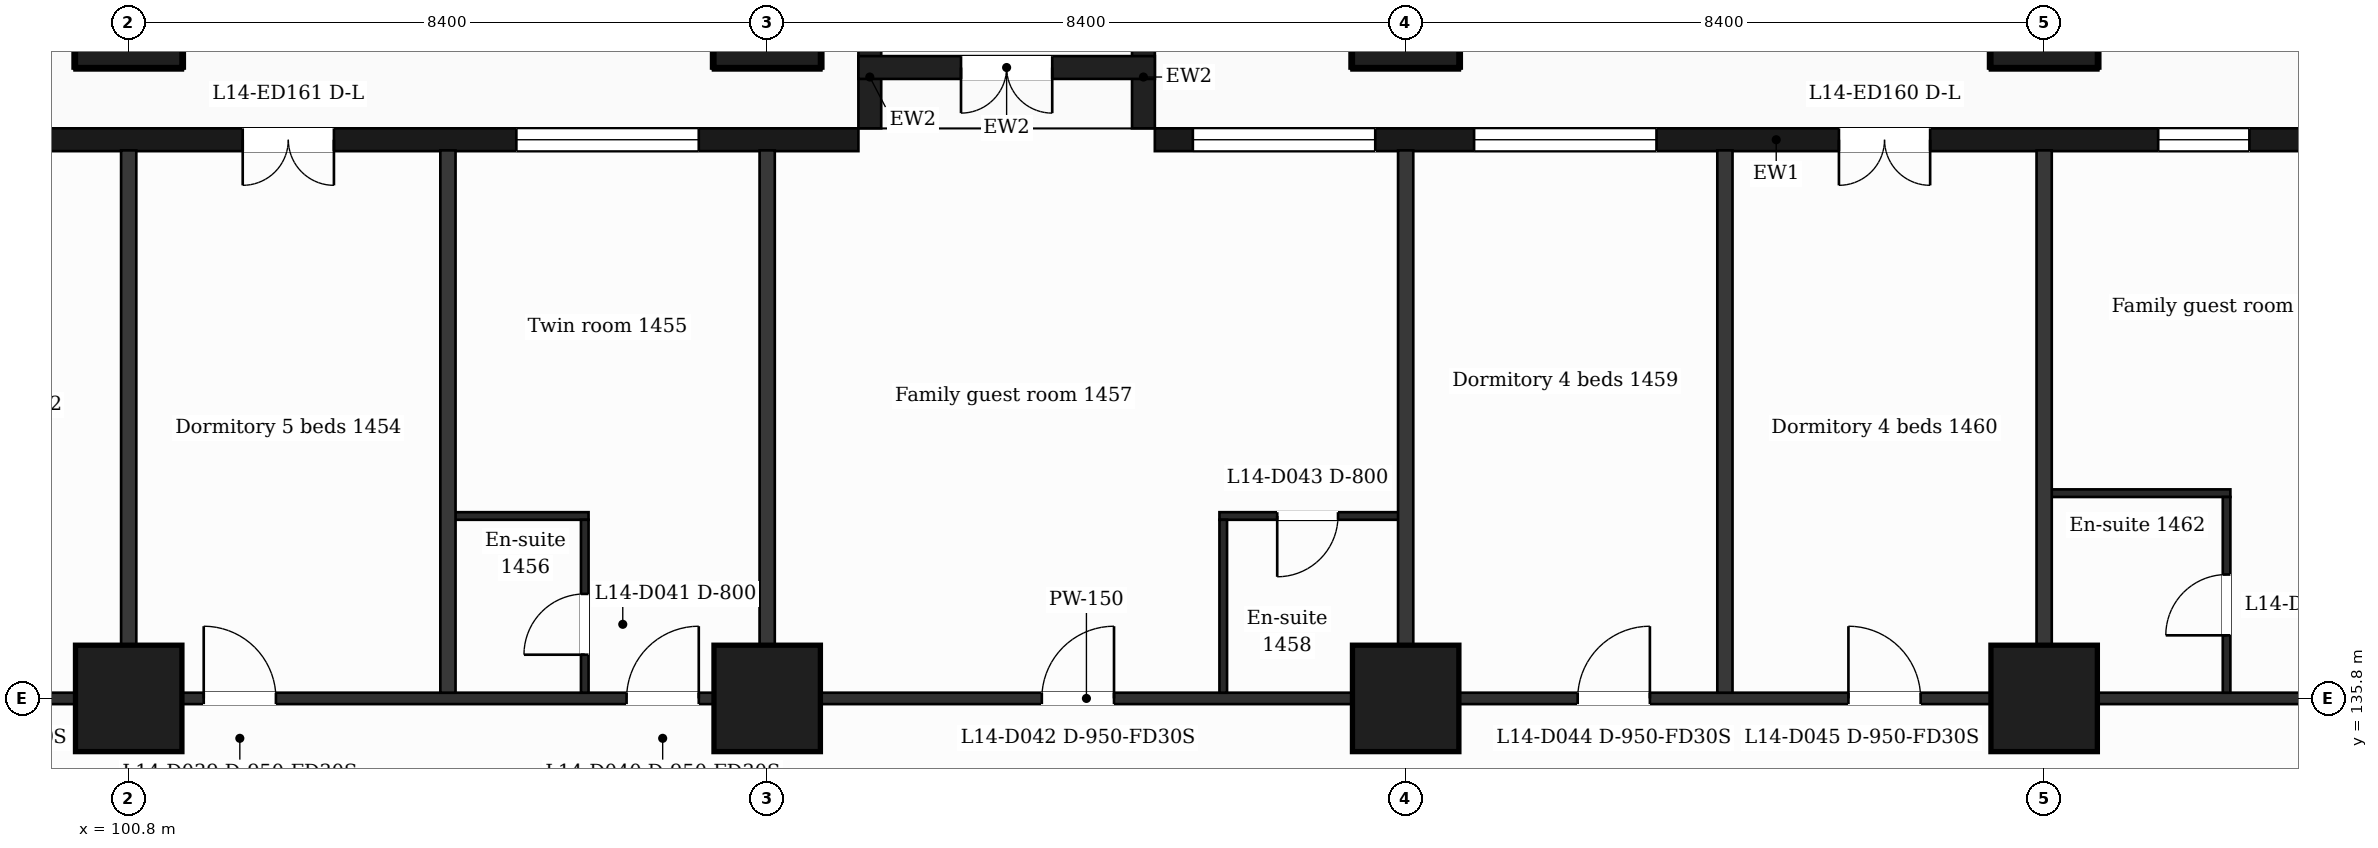
"""IFC4 building model, lengths in metres.
Left out: names, types, materials, properties, quantities, classifications, styles, units other than length and angle.
Written with IfcOpenShell. Run it as: python <this file> out.ifc"""

import sys

from ifc_helpers import new_model, si_unit, direction, frame, frame_2d, origin, origin_2d, place, context, subcontext, project, spatial, rectangle, extrude, element, fill, save


model = new_model("IFC4")
c1 = context("Model", 3, precision=1e-05, world=origin(), true_north=direction((0.0, 1.0)))
c2 = subcontext(c1, "Body", "Model", "MODEL_VIEW")
j1 = project(units=[si_unit("LENGTHUNIT", "METRE"), si_unit("PLANEANGLEUNIT", "RADIAN")], contexts=[c1])
p1 = place(None, origin())
s1 = spatial("IfcSite", under=j1, at=p1, CompositionType="ELEMENT")
p2 = place(p1, origin())
s2 = spatial("IfcBuilding", under=s1, at=p2, CompositionType="ELEMENT")
p3 = place(p2, frame((0.0, 0.0, 67.0)))
s3 = spatial("IfcBuildingStorey", under=s2, at=p3, CompositionType="ELEMENT", Elevation=67.0)
for number, where, z_axis, x_axis in (
    (1, (100.8, 135.8, 0.0), (0.0, 0.0, 1.0), (1.0, 0.0, 0.0)),
    (2, (109.2, 135.8, 0.0), (0.0, 0.0, 1.0), (1.0, 0.0, 0.0)),
    (3, (117.6, 135.8, 0.0), (0.0, 0.0, 1.0), (1.0, 0.0, 0.0)),
    (4, (126.0, 135.8, 0.0), (0.0, 0.0, 1.0), (1.0, 0.0, 0.0)),
    (5, (100.8, 144.8, 0.0), (0.0, 0.0, 1.0), (1.0, 0.0, 0.0)),
    (6, (109.2, 144.8, 0.0), (0.0, 0.0, 1.0), (1.0, 0.0, 0.0)),
    (7, (117.6, 144.8, 0.0), (0.0, 0.0, 1.0), (1.0, 0.0, 0.0)),
    (8, (126.0, 144.8, 0.0), (0.0, 0.0, 1.0), (1.0, 0.0, 0.0)),
):
    element("IfcColumn", number, at=place(p3, frame(where, z_axis=z_axis, x_axis=x_axis)), inside=s3, PredefinedType="COLUMN", context=c2, shape_type="SweptSolid", body=[
        extrude(rectangle(XDim=1.4, YDim=1.4, at=origin_2d()), origin(), (0.0, 0.0, 1.0), 3.5),
    ])
p4 = place(p3, frame((130.65, 143.15, 0.0), z_axis=(0.0, 0.0, 1.0), x_axis=(-1.0, 0.0, 0.0)))
e9 = element("IfcWall", 9, at=p4, inside=s3, PredefinedType="SOLIDWALL", context=c2, shape_type="SweptSolid", body=[
    extrude(rectangle(XDim=16.35, YDim=0.3, at=frame_2d((8.175, 0.0))), origin(), (0.0, 0.0, 1.0), 3.18),
])
p5 = place(p4, frame((1.95, 0.0, 0.9)))
e10 = element("IfcOpeningElement", 10, at=p5, cuts=e9, PredefinedType="OPENING", context=c2, shape_type="SweptSolid", body=[
    extrude(rectangle(XDim=1.2, YDim=2.1, at=frame_2d((0.6, 1.05))), frame((0.0, 0.16, 0.0), z_axis=(0.0, -1.0, 0.0), x_axis=(1.0, 0.0, 0.0)), (0.0, 0.0, 1.0), 0.32),
])
p6 = place(p4, frame((6.15, 0.0, 0.0)))
e11 = element("IfcOpeningElement", 11, at=p6, cuts=e9, PredefinedType="OPENING", context=c2, shape_type="SweptSolid", body=[
    extrude(rectangle(XDim=1.2, YDim=2.4, at=frame_2d((0.6, 1.2))), frame((0.0, 0.16, 0.0), z_axis=(0.0, -1.0, 0.0), x_axis=(1.0, 0.0, 0.0)), (0.0, 0.0, 1.0), 0.32),
])
p7 = place(p4, frame((9.75, 0.0, 0.9)))
e12 = element("IfcOpeningElement", 12, at=p7, cuts=e9, PredefinedType="OPENING", context=c2, shape_type="SweptSolid", body=[
    extrude(rectangle(XDim=2.4, YDim=2.1, at=frame_2d((1.2, 1.05))), frame((0.0, 0.16, 0.0), z_axis=(0.0, -1.0, 0.0), x_axis=(1.0, 0.0, 0.0)), (0.0, 0.0, 1.0), 0.32),
])
p8 = place(p4, frame((13.45, 0.0, 0.9)))
e13 = element("IfcOpeningElement", 13, at=p8, cuts=e9, PredefinedType="OPENING", context=c2, shape_type="SweptSolid", body=[
    extrude(rectangle(XDim=2.4, YDim=2.1, at=frame_2d((1.2, 1.05))), frame((0.0, 0.16, 0.0), z_axis=(0.0, -1.0, 0.0), x_axis=(1.0, 0.0, 0.0)), (0.0, 0.0, 1.0), 0.32),
])
p9 = place(p3, frame((110.4, 143.15, 0.0), z_axis=(0.0, 0.0, 1.0), x_axis=(-1.0, 0.0, 0.0)))
e14 = element("IfcWall", 14, at=p9, inside=s3, PredefinedType="SOLIDWALL", context=c2, shape_type="SweptSolid", body=[
    extrude(rectangle(XDim=14.4, YDim=0.3, at=frame_2d((7.2, 0.0))), origin(), (0.0, 0.0, 1.0), 3.18),
])
p10 = place(p9, frame((2.1, 0.0, 0.9)))
e15 = element("IfcOpeningElement", 15, at=p10, cuts=e14, PredefinedType="OPENING", context=c2, shape_type="SweptSolid", body=[
    extrude(rectangle(XDim=2.4, YDim=2.1, at=frame_2d((1.2, 1.05))), frame((0.0, 0.16, 0.0), z_axis=(0.0, -1.0, 0.0), x_axis=(1.0, 0.0, 0.0)), (0.0, 0.0, 1.0), 0.32),
])
p11 = place(p9, frame((6.9, 0.0, 0.0)))
e16 = element("IfcOpeningElement", 16, at=p11, cuts=e14, PredefinedType="OPENING", context=c2, shape_type="SweptSolid", body=[
    extrude(rectangle(XDim=1.2, YDim=2.4, at=frame_2d((0.6, 1.2))), frame((0.0, 0.16, 0.0), z_axis=(0.0, -1.0, 0.0), x_axis=(1.0, 0.0, 0.0)), (0.0, 0.0, 1.0), 0.32),
])
p12 = place(p9, frame((11.1, 0.0, 0.9)))
e17 = element("IfcOpeningElement", 17, at=p12, cuts=e14, PredefinedType="OPENING", context=c2, shape_type="SweptSolid", body=[
    extrude(rectangle(XDim=1.2, YDim=2.1, at=frame_2d((0.6, 1.05))), frame((0.0, 0.16, 0.0), z_axis=(0.0, -1.0, 0.0), x_axis=(1.0, 0.0, 0.0)), (0.0, 0.0, 1.0), 0.32),
])
for number, where, z_axis, x_axis in (
    (18, (114.15, 143.3, 0.0), (0.0, 0.0, 1.0), (0.0, 1.0, 0.0)),
    (19, (110.55, 143.3, 0.0), (0.0, 0.0, 1.0), (0.0, 1.0, 0.0)),
):
    element("IfcWall", number, at=place(p3, frame(where, z_axis=z_axis, x_axis=x_axis)), inside=s3, PredefinedType="SOLIDWALL", context=c2, shape_type="SweptSolid", body=[
        extrude(rectangle(XDim=1.35, YDim=0.3, at=frame_2d((0.675, 0.0))), origin(), (0.0, 0.0, 1.0), 3.18),
    ])
p13 = place(p3, frame((114.3, 144.1, 0.0), z_axis=(0.0, 0.0, 1.0), x_axis=(-1.0, 0.0, 0.0)))
e20 = element("IfcWall", 20, at=p13, inside=s3, PredefinedType="SOLIDWALL", context=c2, shape_type="SweptSolid", body=[
    extrude(rectangle(XDim=3.9, YDim=0.3, at=frame_2d((1.95, 0.0))), origin(), (0.0, 0.0, 1.0), 3.18),
])
p14 = place(p13, frame((1.35, 0.0, 0.0)))
e21 = element("IfcOpeningElement", 21, at=p14, cuts=e20, PredefinedType="OPENING", context=c2, shape_type="SweptSolid", body=[
    extrude(rectangle(XDim=1.2, YDim=2.4, at=frame_2d((0.6, 1.2))), frame((0.0, 0.16, 0.0), z_axis=(0.0, -1.0, 0.0), x_axis=(1.0, 0.0, 0.0)), (0.0, 0.0, 1.0), 0.32),
])
p15 = place(p3, frame((90.895, 135.8, 0.0), z_axis=(0.0, 0.0, 1.0), x_axis=(1.0, 0.0, 0.0)))
e22 = element("IfcWall", 22, at=p15, inside=s3, PredefinedType="PARTITIONING", context=c2, shape_type="SweptSolid", body=[
    extrude(rectangle(XDim=45.011, YDim=0.15, at=frame_2d((22.505, 0.0))), origin(), (0.0, 0.0, 1.0), 3.18),
])
p16 = place(p15, frame((7.068, 0.0, 0.0)))
e23 = element("IfcOpeningElement", 23, at=p16, cuts=e22, PredefinedType="OPENING", context=c2, shape_type="SweptSolid", body=[
    extrude(rectangle(XDim=0.95, YDim=2.1, at=frame_2d((0.475, 1.05))), frame((0.0, 0.085, 0.0), z_axis=(0.0, -1.0, 0.0), x_axis=(1.0, 0.0, 0.0)), (0.0, 0.0, 1.0), 0.17),
])
p17 = place(p15, frame((10.892, 0.0, 0.0)))
e24 = element("IfcOpeningElement", 24, at=p17, cuts=e22, PredefinedType="OPENING", context=c2, shape_type="SweptSolid", body=[
    extrude(rectangle(XDim=0.95, YDim=2.1, at=frame_2d((0.475, 1.05))), frame((0.0, 0.085, 0.0), z_axis=(0.0, -1.0, 0.0), x_axis=(1.0, 0.0, 0.0)), (0.0, 0.0, 1.0), 0.17),
])
p18 = place(p15, frame((16.455, 0.0, 0.0)))
e25 = element("IfcOpeningElement", 25, at=p18, cuts=e22, PredefinedType="OPENING", context=c2, shape_type="SweptSolid", body=[
    extrude(rectangle(XDim=0.95, YDim=2.1, at=frame_2d((0.475, 1.05))), frame((0.0, 0.085, 0.0), z_axis=(0.0, -1.0, 0.0), x_axis=(1.0, 0.0, 0.0)), (0.0, 0.0, 1.0), 0.17),
])
p19 = place(p15, frame((21.918, 0.0, 0.0)))
e26 = element("IfcOpeningElement", 26, at=p19, cuts=e22, PredefinedType="OPENING", context=c2, shape_type="SweptSolid", body=[
    extrude(rectangle(XDim=0.95, YDim=2.1, at=frame_2d((0.475, 1.05))), frame((0.0, 0.085, 0.0), z_axis=(0.0, -1.0, 0.0), x_axis=(1.0, 0.0, 0.0)), (0.0, 0.0, 1.0), 0.17),
])
p20 = place(p15, frame((28.969, 0.0, 0.0)))
e27 = element("IfcOpeningElement", 27, at=p20, cuts=e22, PredefinedType="OPENING", context=c2, shape_type="SweptSolid", body=[
    extrude(rectangle(XDim=0.95, YDim=2.1, at=frame_2d((0.475, 1.05))), frame((0.0, 0.085, 0.0), z_axis=(0.0, -1.0, 0.0), x_axis=(1.0, 0.0, 0.0)), (0.0, 0.0, 1.0), 0.17),
])
p21 = place(p15, frame((32.531, 0.0, 0.0)))
e28 = element("IfcOpeningElement", 28, at=p21, cuts=e22, PredefinedType="OPENING", context=c2, shape_type="SweptSolid", body=[
    extrude(rectangle(XDim=0.95, YDim=2.1, at=frame_2d((0.475, 1.05))), frame((0.0, 0.085, 0.0), z_axis=(0.0, -1.0, 0.0), x_axis=(1.0, 0.0, 0.0)), (0.0, 0.0, 1.0), 0.17),
])
p22 = place(p15, frame((40.929, 0.0, 0.0)))
e29 = element("IfcOpeningElement", 29, at=p22, cuts=e22, PredefinedType="OPENING", context=c2, shape_type="SweptSolid", body=[
    extrude(rectangle(XDim=0.95, YDim=2.1, at=frame_2d((0.475, 1.05))), frame((0.0, 0.085, 0.0), z_axis=(0.0, -1.0, 0.0), x_axis=(1.0, 0.0, 0.0)), (0.0, 0.0, 1.0), 0.17),
])
p23 = place(p3, frame((105.0, 138.2, 0.0), z_axis=(0.0, 0.0, 1.0), x_axis=(1.0, 0.0, 0.0)))
e30 = element("IfcWall", 30, at=p23, inside=s3, PredefinedType="PARTITIONING", context=c2, shape_type="SweptSolid", body=[
    extrude(rectangle(XDim=1.85, YDim=0.1, at=frame_2d((0.925, 0.0))), origin(), (0.0, 0.0, 1.0), 3.18),
])
p24 = place(p3, frame((115.15, 138.2, 0.0), z_axis=(0.0, 0.0, 1.0), x_axis=(1.0, 0.0, 0.0)))
e31 = element("IfcWall", 31, at=p24, inside=s3, PredefinedType="PARTITIONING", context=c2, shape_type="SweptSolid", body=[
    extrude(rectangle(XDim=2.45, YDim=0.1, at=frame_2d((1.225, 0.0))), origin(), (0.0, 0.0, 1.0), 3.18),
])
p25 = place(p24, frame((0.76, 0.0, 0.0)))
e32 = element("IfcOpeningElement", 32, at=p25, cuts=e31, PredefinedType="OPENING", context=c2, shape_type="SweptSolid", body=[
    extrude(rectangle(XDim=0.8, YDim=2.1, at=frame_2d((0.4, 1.05))), frame((0.0, 0.06, 0.0), z_axis=(0.0, -1.0, 0.0), x_axis=(1.0, 0.0, 0.0)), (0.0, 0.0, 1.0), 0.12),
])
p26 = place(p3, frame((126.0, 138.5, 0.0), z_axis=(0.0, 0.0, 1.0), x_axis=(1.0, 0.0, 0.0)))
e33 = element("IfcWall", 33, at=p26, inside=s3, PredefinedType="PARTITIONING", context=c2, shape_type="SweptSolid", body=[
    extrude(rectangle(XDim=2.45, YDim=0.1, at=frame_2d((1.225, 0.0))), origin(), (0.0, 0.0, 1.0), 3.18),
])
for number, where, z_axis, x_axis in (
    (34, (100.8, 135.875, 0.0), (0.0, 0.0, 1.0), (0.0, 1.0, 0.0)),
    (35, (105.0, 135.875, 0.0), (0.0, 0.0, 1.0), (0.0, 1.0, 0.0)),
):
    element("IfcWall", number, at=place(p3, frame(where, z_axis=z_axis, x_axis=x_axis)), inside=s3, PredefinedType="PARTITIONING", context=c2, shape_type="SweptSolid", body=[
        extrude(rectangle(XDim=7.135, YDim=0.2, at=frame_2d((3.567, 0.0))), origin(), (0.0, 0.0, 1.0), 3.18),
    ])
p27 = place(p3, frame((106.8, 135.875, 0.0), z_axis=(0.0, 0.0, 1.0), x_axis=(0.0, 1.0, 0.0)))
e36 = element("IfcWall", 36, at=p27, inside=s3, PredefinedType="PARTITIONING", context=c2, shape_type="SweptSolid", body=[
    extrude(rectangle(XDim=2.275, YDim=0.1, at=frame_2d((1.137, 0.0))), origin(), (0.0, 0.0, 1.0), 3.18),
])
p28 = place(p27, frame((0.5, 0.0, 0.0)))
e37 = element("IfcOpeningElement", 37, at=p28, cuts=e36, PredefinedType="OPENING", context=c2, shape_type="SweptSolid", body=[
    extrude(rectangle(XDim=0.8, YDim=2.1, at=frame_2d((0.4, 1.05))), frame((0.0, 0.06, 0.0), z_axis=(0.0, -1.0, 0.0), x_axis=(1.0, 0.0, 0.0)), (0.0, 0.0, 1.0), 0.12),
])
p29 = place(p3, frame((109.2, 135.875, 0.0), z_axis=(0.0, 0.0, 1.0), x_axis=(0.0, 1.0, 0.0)))
e38 = element("IfcWall", 38, at=p29, inside=s3, PredefinedType="PARTITIONING", context=c2, shape_type="SweptSolid", body=[
    extrude(rectangle(XDim=7.135, YDim=0.2, at=frame_2d((3.567, 0.0))), origin(), (0.0, 0.0, 1.0), 3.18),
])
p30 = place(p3, frame((115.2, 135.875, 0.0), z_axis=(0.0, 0.0, 1.0), x_axis=(0.0, 1.0, 0.0)))
e39 = element("IfcWall", 39, at=p30, inside=s3, PredefinedType="PARTITIONING", context=c2, shape_type="SweptSolid", body=[
    extrude(rectangle(XDim=2.275, YDim=0.1, at=frame_2d((1.137, 0.0))), origin(), (0.0, 0.0, 1.0), 3.18),
])
for number, where, z_axis, x_axis in (
    (40, (117.6, 135.875, 0.0), (0.0, 0.0, 1.0), (0.0, 1.0, 0.0)),
    (41, (121.8, 135.875, 0.0), (0.0, 0.0, 1.0), (0.0, 1.0, 0.0)),
    (42, (126.0, 135.875, 0.0), (0.0, 0.0, 1.0), (0.0, 1.0, 0.0)),
):
    element("IfcWall", number, at=place(p3, frame(where, z_axis=z_axis, x_axis=x_axis)), inside=s3, PredefinedType="PARTITIONING", context=c2, shape_type="SweptSolid", body=[
        extrude(rectangle(XDim=7.135, YDim=0.2, at=frame_2d((3.567, 0.0))), origin(), (0.0, 0.0, 1.0), 3.18),
    ])
p31 = place(p3, frame((128.4, 135.875, 0.0), z_axis=(0.0, 0.0, 1.0), x_axis=(0.0, 1.0, 0.0)))
e43 = element("IfcWall", 43, at=p31, inside=s3, PredefinedType="PARTITIONING", context=c2, shape_type="SweptSolid", body=[
    extrude(rectangle(XDim=2.575, YDim=0.1, at=frame_2d((1.288, 0.0))), origin(), (0.0, 0.0, 1.0), 3.18),
])
p32 = place(p31, frame((0.755, 0.0, 0.0)))
e44 = element("IfcOpeningElement", 44, at=p32, cuts=e43, PredefinedType="OPENING", context=c2, shape_type="SweptSolid", body=[
    extrude(rectangle(XDim=0.8, YDim=2.1, at=frame_2d((0.4, 1.05))), frame((0.0, 0.06, 0.0), z_axis=(0.0, -1.0, 0.0), x_axis=(1.0, 0.0, 0.0)), (0.0, 0.0, 1.0), 0.12),
])
p33 = place(p5, origin())
e45 = element("IfcWindow", 45, at=p33, inside=s3, PartitioningType="SINGLE_PANEL", PredefinedType="WINDOW", context=c2, shape_type="SweptSolid", body=[
    extrude(rectangle(XDim=1.2, YDim=2.1, at=frame_2d((0.6, 1.05))), frame((0.0, 0.03, 0.0), z_axis=(0.0, -1.0, 0.0), x_axis=(1.0, 0.0, 0.0)), (0.0, 0.0, 1.0), 0.06),
])
fill(e10, e45)
p34 = place(p6, origin())
e46 = element("IfcDoor", 46, at=p34, inside=s3, OperationType="DOUBLE_DOOR_SINGLE_SWING", PredefinedType="DOOR", context=c2, shape_type="SweptSolid", body=[
    extrude(rectangle(XDim=1.2, YDim=2.4, at=frame_2d((0.6, 1.2))), frame((0.0, 0.025, 0.0), z_axis=(0.0, -1.0, 0.0), x_axis=(1.0, 0.0, 0.0)), (0.0, 0.0, 1.0), 0.05),
])
fill(e11, e46)
p35 = place(p7, origin())
e47 = element("IfcWindow", 47, at=p35, inside=s3, PartitioningType="SINGLE_PANEL", PredefinedType="WINDOW", context=c2, shape_type="SweptSolid", body=[
    extrude(rectangle(XDim=2.4, YDim=2.1, at=frame_2d((1.2, 1.05))), frame((0.0, 0.03, 0.0), z_axis=(0.0, -1.0, 0.0), x_axis=(1.0, 0.0, 0.0)), (0.0, 0.0, 1.0), 0.06),
])
fill(e12, e47)
p36 = place(p8, origin())
e48 = element("IfcWindow", 48, at=p36, inside=s3, PartitioningType="SINGLE_PANEL", PredefinedType="WINDOW", context=c2, shape_type="SweptSolid", body=[
    extrude(rectangle(XDim=2.4, YDim=2.1, at=frame_2d((1.2, 1.05))), frame((0.0, 0.03, 0.0), z_axis=(0.0, -1.0, 0.0), x_axis=(1.0, 0.0, 0.0)), (0.0, 0.0, 1.0), 0.06),
])
fill(e13, e48)
p37 = place(p10, origin())
e49 = element("IfcWindow", 49, at=p37, inside=s3, PartitioningType="SINGLE_PANEL", PredefinedType="WINDOW", context=c2, shape_type="SweptSolid", body=[
    extrude(rectangle(XDim=2.4, YDim=2.1, at=frame_2d((1.2, 1.05))), frame((0.0, 0.03, 0.0), z_axis=(0.0, -1.0, 0.0), x_axis=(1.0, 0.0, 0.0)), (0.0, 0.0, 1.0), 0.06),
])
fill(e15, e49)
p38 = place(p11, origin())
e50 = element("IfcDoor", 50, at=p38, inside=s3, OperationType="DOUBLE_DOOR_SINGLE_SWING", PredefinedType="DOOR", context=c2, shape_type="SweptSolid", body=[
    extrude(rectangle(XDim=1.2, YDim=2.4, at=frame_2d((0.6, 1.2))), frame((0.0, 0.025, 0.0), z_axis=(0.0, -1.0, 0.0), x_axis=(1.0, 0.0, 0.0)), (0.0, 0.0, 1.0), 0.05),
])
fill(e16, e50)
p39 = place(p14, origin())
e51 = element("IfcDoor", 51, at=p39, inside=s3, OperationType="DOUBLE_DOOR_SINGLE_SWING", PredefinedType="DOOR", context=c2, shape_type="SweptSolid", body=[
    extrude(rectangle(XDim=1.2, YDim=2.4, at=frame_2d((0.6, 1.2))), frame((0.0, 0.025, 0.0), z_axis=(0.0, -1.0, 0.0), x_axis=(1.0, 0.0, 0.0)), (0.0, 0.0, 1.0), 0.05),
])
fill(e21, e51)
p40 = place(p17, origin())
e52 = element("IfcDoor", 52, at=p40, inside=s3, OperationType="SINGLE_SWING_LEFT", PredefinedType="DOOR", context=c2, shape_type="SweptSolid", body=[
    extrude(rectangle(XDim=0.95, YDim=2.1, at=frame_2d((0.475, 1.05))), frame((0.0, 0.025, 0.0), z_axis=(0.0, -1.0, 0.0), x_axis=(1.0, 0.0, 0.0)), (0.0, 0.0, 1.0), 0.05),
])
fill(e24, e52)
p41 = place(p18, origin())
e53 = element("IfcDoor", 53, at=p41, inside=s3, OperationType="SINGLE_SWING_RIGHT", PredefinedType="DOOR", context=c2, shape_type="SweptSolid", body=[
    extrude(rectangle(XDim=0.95, YDim=2.1, at=frame_2d((0.475, 1.05))), frame((0.0, 0.025, 0.0), z_axis=(0.0, -1.0, 0.0), x_axis=(1.0, 0.0, 0.0)), (0.0, 0.0, 1.0), 0.05),
])
fill(e25, e53)
p42 = place(p28, origin())
e54 = element("IfcDoor", 54, at=p42, inside=s3, OperationType="SINGLE_SWING_LEFT", PredefinedType="DOOR", context=c2, shape_type="SweptSolid", body=[
    extrude(rectangle(XDim=0.8, YDim=2.1, at=frame_2d((0.4, 1.05))), frame((0.0, 0.025, 0.0), z_axis=(0.0, -1.0, 0.0), x_axis=(1.0, 0.0, 0.0)), (0.0, 0.0, 1.0), 0.05),
])
fill(e37, e54)
p43 = place(p19, origin())
e55 = element("IfcDoor", 55, at=p43, inside=s3, OperationType="SINGLE_SWING_RIGHT", PredefinedType="DOOR", context=c2, shape_type="SweptSolid", body=[
    extrude(rectangle(XDim=0.95, YDim=2.1, at=frame_2d((0.475, 1.05))), frame((0.0, 0.025, 0.0), z_axis=(0.0, -1.0, 0.0), x_axis=(1.0, 0.0, 0.0)), (0.0, 0.0, 1.0), 0.05),
])
fill(e26, e55)
p44 = place(p25, origin())
e56 = element("IfcDoor", 56, at=p44, inside=s3, OperationType="SINGLE_SWING_LEFT", PredefinedType="DOOR", context=c2, shape_type="SweptSolid", body=[
    extrude(rectangle(XDim=0.8, YDim=2.1, at=frame_2d((0.4, 1.05))), frame((0.0, 0.025, 0.0), z_axis=(0.0, -1.0, 0.0), x_axis=(1.0, 0.0, 0.0)), (0.0, 0.0, 1.0), 0.05),
])
fill(e32, e56)
p45 = place(p20, origin())
e57 = element("IfcDoor", 57, at=p45, inside=s3, OperationType="SINGLE_SWING_RIGHT", PredefinedType="DOOR", context=c2, shape_type="SweptSolid", body=[
    extrude(rectangle(XDim=0.95, YDim=2.1, at=frame_2d((0.475, 1.05))), frame((0.0, 0.025, 0.0), z_axis=(0.0, -1.0, 0.0), x_axis=(1.0, 0.0, 0.0)), (0.0, 0.0, 1.0), 0.05),
])
fill(e27, e57)
p46 = place(p21, origin())
e58 = element("IfcDoor", 58, at=p46, inside=s3, OperationType="SINGLE_SWING_LEFT", PredefinedType="DOOR", context=c2, shape_type="SweptSolid", body=[
    extrude(rectangle(XDim=0.95, YDim=2.1, at=frame_2d((0.475, 1.05))), frame((0.0, 0.025, 0.0), z_axis=(0.0, -1.0, 0.0), x_axis=(1.0, 0.0, 0.0)), (0.0, 0.0, 1.0), 0.05),
])
fill(e28, e58)
p47 = place(p32, origin())
e59 = element("IfcDoor", 59, at=p47, inside=s3, OperationType="SINGLE_SWING_LEFT", PredefinedType="DOOR", context=c2, shape_type="SweptSolid", body=[
    extrude(rectangle(XDim=0.8, YDim=2.1, at=frame_2d((0.4, 1.05))), frame((0.0, 0.025, 0.0), z_axis=(0.0, -1.0, 0.0), x_axis=(1.0, 0.0, 0.0)), (0.0, 0.0, 1.0), 0.05),
])
fill(e44, e59)
save(model, sys.argv[1])
